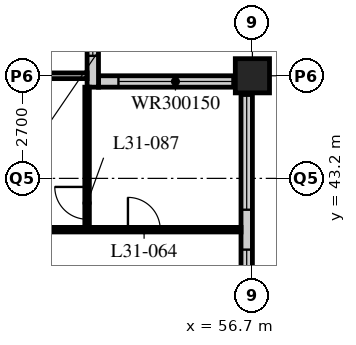
"""IFC4 building model, lengths in metres.
Left out: names, types, materials, properties, quantities, classifications, styles, units other than length and angle.
Written with IfcOpenShell. Run it as: python <this file> out.ifc"""

import sys

from ifc_helpers import new_model, si_unit, direction, frame, frame_2d, origin, origin_2d, place, context, subcontext, project, spatial, rectangle, hollow_rectangle, extrude, element, fill, save


model = new_model("IFC4")
c1 = context("Model", 3, precision=1e-05, world=origin(), true_north=direction((0.0, 1.0)))
c2 = subcontext(c1, "Body", "Model", "MODEL_VIEW")
j1 = project(units=[si_unit("LENGTHUNIT", "METRE"), si_unit("PLANEANGLEUNIT", "RADIAN")], contexts=[c1])
p1 = place(None, origin())
s1 = spatial("IfcSite", under=j1, at=p1, CompositionType="ELEMENT")
p2 = place(p1, origin())
s2 = spatial("IfcBuilding", under=s1, at=p2, CompositionType="ELEMENT")
p3 = place(p2, frame((0.0, 0.0, 123.8)))
s3 = spatial("IfcBuildingStorey", under=s2, at=p3, CompositionType="ELEMENT", Elevation=123.8)
p4 = place(p3, frame((56.7, 45.9, 0.0), z_axis=(0.0, 0.0, 1.0), x_axis=(1.0, 0.0, 0.0)))
e1 = element("IfcColumn", 1, at=p4, inside=s3, PredefinedType="COLUMN", context=c2, shape_type="SweptSolid", body=[
    extrude(hollow_rectangle(XDim=0.9, YDim=0.9, WallThickness=0.09, at=origin_2d()), origin(), (0.0, 0.0, 1.0), 3.4),
])
p5 = place(p3, frame((56.55, 13.8, 0.0), z_axis=(0.0, 0.0, 1.0), x_axis=(0.0, 1.0, 0.0)))
e2 = element("IfcWall", 2, at=p5, inside=s3, PredefinedType="SOLIDWALL", context=c2, shape_type="SweptSolid", body=[
    extrude(rectangle(XDim=32.1, YDim=0.3, at=frame_2d((16.05, 0.0))), origin(), (0.0, 0.0, 1.0), 3.19),
])
p6 = place(p5, frame((0.225, 0.0, 0.9)))
e3 = element("IfcOpeningElement", 3, at=p6, cuts=e2, PredefinedType="OPENING", context=c2, shape_type="SweptSolid", body=[
    extrude(rectangle(XDim=3.0, YDim=2.0, at=frame_2d((1.5, 1.0))), frame((0.0, 0.16, 0.0), z_axis=(0.0, -1.0, 0.0), x_axis=(1.0, 0.0, 0.0)), (0.0, 0.0, 1.0), 0.32),
])
p7 = place(p5, frame((4.275, 0.0, 0.9)))
e4 = element("IfcOpeningElement", 4, at=p7, cuts=e2, PredefinedType="OPENING", context=c2, shape_type="SweptSolid", body=[
    extrude(rectangle(XDim=3.0, YDim=2.0, at=frame_2d((1.5, 1.0))), frame((0.0, 0.16, 0.0), z_axis=(0.0, -1.0, 0.0), x_axis=(1.0, 0.0, 0.0)), (0.0, 0.0, 1.0), 0.32),
])
p8 = place(p5, frame((8.325, 0.0, 0.9)))
e5 = element("IfcOpeningElement", 5, at=p8, cuts=e2, PredefinedType="OPENING", context=c2, shape_type="SweptSolid", body=[
    extrude(rectangle(XDim=3.0, YDim=2.0, at=frame_2d((1.5, 1.0))), frame((0.0, 0.16, 0.0), z_axis=(0.0, -1.0, 0.0), x_axis=(1.0, 0.0, 0.0)), (0.0, 0.0, 1.0), 0.32),
])
p9 = place(p5, frame((12.375, 0.0, 0.9)))
e6 = element("IfcOpeningElement", 6, at=p9, cuts=e2, PredefinedType="OPENING", context=c2, shape_type="SweptSolid", body=[
    extrude(rectangle(XDim=3.0, YDim=2.0, at=frame_2d((1.5, 1.0))), frame((0.0, 0.16, 0.0), z_axis=(0.0, -1.0, 0.0), x_axis=(1.0, 0.0, 0.0)), (0.0, 0.0, 1.0), 0.32),
])
p10 = place(p5, frame((16.425, 0.0, 0.9)))
e7 = element("IfcOpeningElement", 7, at=p10, cuts=e2, PredefinedType="OPENING", context=c2, shape_type="SweptSolid", body=[
    extrude(rectangle(XDim=3.0, YDim=2.0, at=frame_2d((1.5, 1.0))), frame((0.0, 0.16, 0.0), z_axis=(0.0, -1.0, 0.0), x_axis=(1.0, 0.0, 0.0)), (0.0, 0.0, 1.0), 0.32),
])
p11 = place(p5, frame((20.475, 0.0, 0.9)))
e8 = element("IfcOpeningElement", 8, at=p11, cuts=e2, PredefinedType="OPENING", context=c2, shape_type="SweptSolid", body=[
    extrude(rectangle(XDim=3.0, YDim=2.0, at=frame_2d((1.5, 1.0))), frame((0.0, 0.16, 0.0), z_axis=(0.0, -1.0, 0.0), x_axis=(1.0, 0.0, 0.0)), (0.0, 0.0, 1.0), 0.32),
])
p12 = place(p5, frame((24.525, 0.0, 0.9)))
e9 = element("IfcOpeningElement", 9, at=p12, cuts=e2, PredefinedType="OPENING", context=c2, shape_type="SweptSolid", body=[
    extrude(rectangle(XDim=3.0, YDim=2.0, at=frame_2d((1.5, 1.0))), frame((0.0, 0.16, 0.0), z_axis=(0.0, -1.0, 0.0), x_axis=(1.0, 0.0, 0.0)), (0.0, 0.0, 1.0), 0.32),
])
p13 = place(p5, frame((28.575, 0.0, 0.9)))
e10 = element("IfcOpeningElement", 10, at=p13, cuts=e2, PredefinedType="OPENING", context=c2, shape_type="SweptSolid", body=[
    extrude(rectangle(XDim=3.0, YDim=2.0, at=frame_2d((1.5, 1.0))), frame((0.0, 0.16, 0.0), z_axis=(0.0, -1.0, 0.0), x_axis=(1.0, 0.0, 0.0)), (0.0, 0.0, 1.0), 0.32),
])
p14 = place(p3, frame((56.4, 45.75, 0.0), z_axis=(0.0, 0.0, 1.0), x_axis=(-1.0, 0.0, 0.0)))
e11 = element("IfcWall", 11, at=p14, inside=s3, PredefinedType="SOLIDWALL", context=c2, shape_type="SweptSolid", body=[
    extrude(rectangle(XDim=3.75, YDim=0.3, at=frame_2d((1.875, 0.0))), origin(), (0.0, 0.0, 1.0), 3.19),
])
p15 = place(p14, frame((0.225, 0.0, 0.9)))
e12 = element("IfcOpeningElement", 12, at=p15, cuts=e11, PredefinedType="OPENING", context=c2, shape_type="SweptSolid", body=[
    extrude(rectangle(XDim=3.0, YDim=1.5, at=frame_2d((1.5, 0.75))), frame((0.0, 0.16, 0.0), z_axis=(0.0, -1.0, 0.0), x_axis=(1.0, 0.0, 0.0)), (0.0, 0.0, 1.0), 0.32),
])
p16 = place(p3, frame((52.5, 45.6, 0.0), z_axis=(0.0, 0.0, 1.0), x_axis=(0.0, 1.0, 0.0)))
e13 = element("IfcWall", 13, at=p16, inside=s3, PredefinedType="SOLIDWALL", context=c2, shape_type="SweptSolid", body=[
    extrude(rectangle(XDim=4.35, YDim=0.3, at=frame_2d((2.175, 0.0))), origin(), (0.0, 0.0, 1.0), 3.19),
])
p17 = place(p16, frame((0.825, 0.0, 0.9)))
e14 = element("IfcOpeningElement", 14, at=p17, cuts=e13, PredefinedType="OPENING", context=c2, shape_type="SweptSolid", body=[
    extrude(rectangle(XDim=3.0, YDim=1.5, at=frame_2d((1.5, 0.75))), frame((0.0, 0.16, 0.0), z_axis=(0.0, -1.0, 0.0), x_axis=(1.0, 0.0, 0.0)), (0.0, 0.0, 1.0), 0.32),
])
p18 = place(p3, frame((48.6, 41.85, 0.0), z_axis=(0.0, 0.0, 1.0), x_axis=(1.0, 0.0, 0.0)))
e15 = element("IfcWall", 15, at=p18, inside=s3, PredefinedType="PARTITIONING", context=c2, shape_type="SweptSolid", body=[
    extrude(rectangle(XDim=7.8, YDim=0.12, at=frame_2d((3.9, 0.0))), origin(), (0.0, 0.0, 1.0), 3.19),
])
p19 = place(p18, frame((4.825, 0.0, 0.0)))
e16 = element("IfcOpeningElement", 16, at=p19, cuts=e15, PredefinedType="OPENING", context=c2, shape_type="SweptSolid", body=[
    extrude(rectangle(XDim=0.85, YDim=2.1, at=frame_2d((0.425, 1.05))), frame((0.0, 0.07, 0.0), z_axis=(0.0, -1.0, 0.0), x_axis=(1.0, 0.0, 0.0)), (0.0, 0.0, 1.0), 0.14),
])
p20 = place(p3, frame((48.6, 45.9, 0.0), z_axis=(0.0, 0.0, 1.0), x_axis=(1.0, 0.0, 0.0)))
e17 = element("IfcWall", 17, at=p20, inside=s3, PredefinedType="PARTITIONING", context=c2, shape_type="SweptSolid", body=[
    extrude(rectangle(XDim=3.75, YDim=0.15, at=frame_2d((1.875, 0.0))), origin(), (0.0, 0.0, 1.0), 2.578),
])
p21 = place(p3, frame((52.35, 45.6, 0.0), z_axis=(0.0, 0.0, 1.0), x_axis=(0.0, -1.0, 0.0)))
e18 = element("IfcWall", 18, at=p21, inside=s3, PredefinedType="PARTITIONING", context=c2, shape_type="SweptSolid", body=[
    extrude(rectangle(XDim=3.75, YDim=0.12, at=frame_2d((1.875, 0.0))), origin(), (0.0, 0.0, 1.0), 3.19),
])
p22 = place(p21, frame((2.625, 0.0, 0.0)))
e19 = element("IfcOpeningElement", 19, at=p22, cuts=e18, PredefinedType="OPENING", context=c2, shape_type="SweptSolid", body=[
    extrude(rectangle(XDim=0.85, YDim=2.1, at=frame_2d((0.425, 1.05))), frame((0.0, 0.07, 0.0), z_axis=(0.0, -1.0, 0.0), x_axis=(1.0, 0.0, 0.0)), (0.0, 0.0, 1.0), 0.14),
])
p23 = place(p12, origin())
e20 = element("IfcWindow", 20, at=p23, inside=s3, PartitioningType="SINGLE_PANEL", PredefinedType="WINDOW", context=c2, shape_type="SweptSolid", body=[
    extrude(rectangle(XDim=3.0, YDim=2.0, at=frame_2d((1.5, 1.0))), frame((0.0, 0.03, 0.0), z_axis=(0.0, -1.0, 0.0), x_axis=(1.0, 0.0, 0.0)), (0.0, 0.0, 1.0), 0.06),
])
fill(e9, e20)
p24 = place(p13, origin())
e21 = element("IfcWindow", 21, at=p24, inside=s3, PartitioningType="SINGLE_PANEL", PredefinedType="WINDOW", context=c2, shape_type="SweptSolid", body=[
    extrude(rectangle(XDim=3.0, YDim=2.0, at=frame_2d((1.5, 1.0))), frame((0.0, 0.03, 0.0), z_axis=(0.0, -1.0, 0.0), x_axis=(1.0, 0.0, 0.0)), (0.0, 0.0, 1.0), 0.06),
])
fill(e10, e21)
p25 = place(p15, origin())
e22 = element("IfcWindow", 22, at=p25, inside=s3, PartitioningType="SINGLE_PANEL", PredefinedType="WINDOW", context=c2, shape_type="SweptSolid", body=[
    extrude(rectangle(XDim=3.0, YDim=1.5, at=frame_2d((1.5, 0.75))), frame((0.0, 0.03, 0.0), z_axis=(0.0, -1.0, 0.0), x_axis=(1.0, 0.0, 0.0)), (0.0, 0.0, 1.0), 0.06),
])
fill(e12, e22)
p26 = place(p17, origin())
e23 = element("IfcWindow", 23, at=p26, inside=s3, PartitioningType="SINGLE_PANEL", PredefinedType="WINDOW", context=c2, shape_type="SweptSolid", body=[
    extrude(rectangle(XDim=3.0, YDim=1.5, at=frame_2d((1.5, 0.75))), frame((0.0, 0.03, 0.0), z_axis=(0.0, -1.0, 0.0), x_axis=(1.0, 0.0, 0.0)), (0.0, 0.0, 1.0), 0.06),
])
fill(e14, e23)
p27 = place(p19, origin())
e24 = element("IfcDoor", 24, at=p27, inside=s3, OperationType="SINGLE_SWING_LEFT", PredefinedType="DOOR", context=c2, shape_type="SweptSolid", body=[
    extrude(rectangle(XDim=0.85, YDim=2.1, at=frame_2d((0.425, 1.05))), frame((0.0, 0.025, 0.0), z_axis=(0.0, -1.0, 0.0), x_axis=(1.0, 0.0, 0.0)), (0.0, 0.0, 1.0), 0.05),
])
fill(e16, e24)
p28 = place(p22, origin())
e25 = element("IfcDoor", 25, at=p28, inside=s3, OperationType="SINGLE_SWING_RIGHT", PredefinedType="DOOR", context=c2, shape_type="SweptSolid", body=[
    extrude(rectangle(XDim=0.85, YDim=2.1, at=frame_2d((0.425, 1.05))), frame((0.0, 0.025, 0.0), z_axis=(0.0, -1.0, 0.0), x_axis=(1.0, 0.0, 0.0)), (0.0, 0.0, 1.0), 0.05),
])
fill(e19, e25)
save(model, sys.argv[1])
